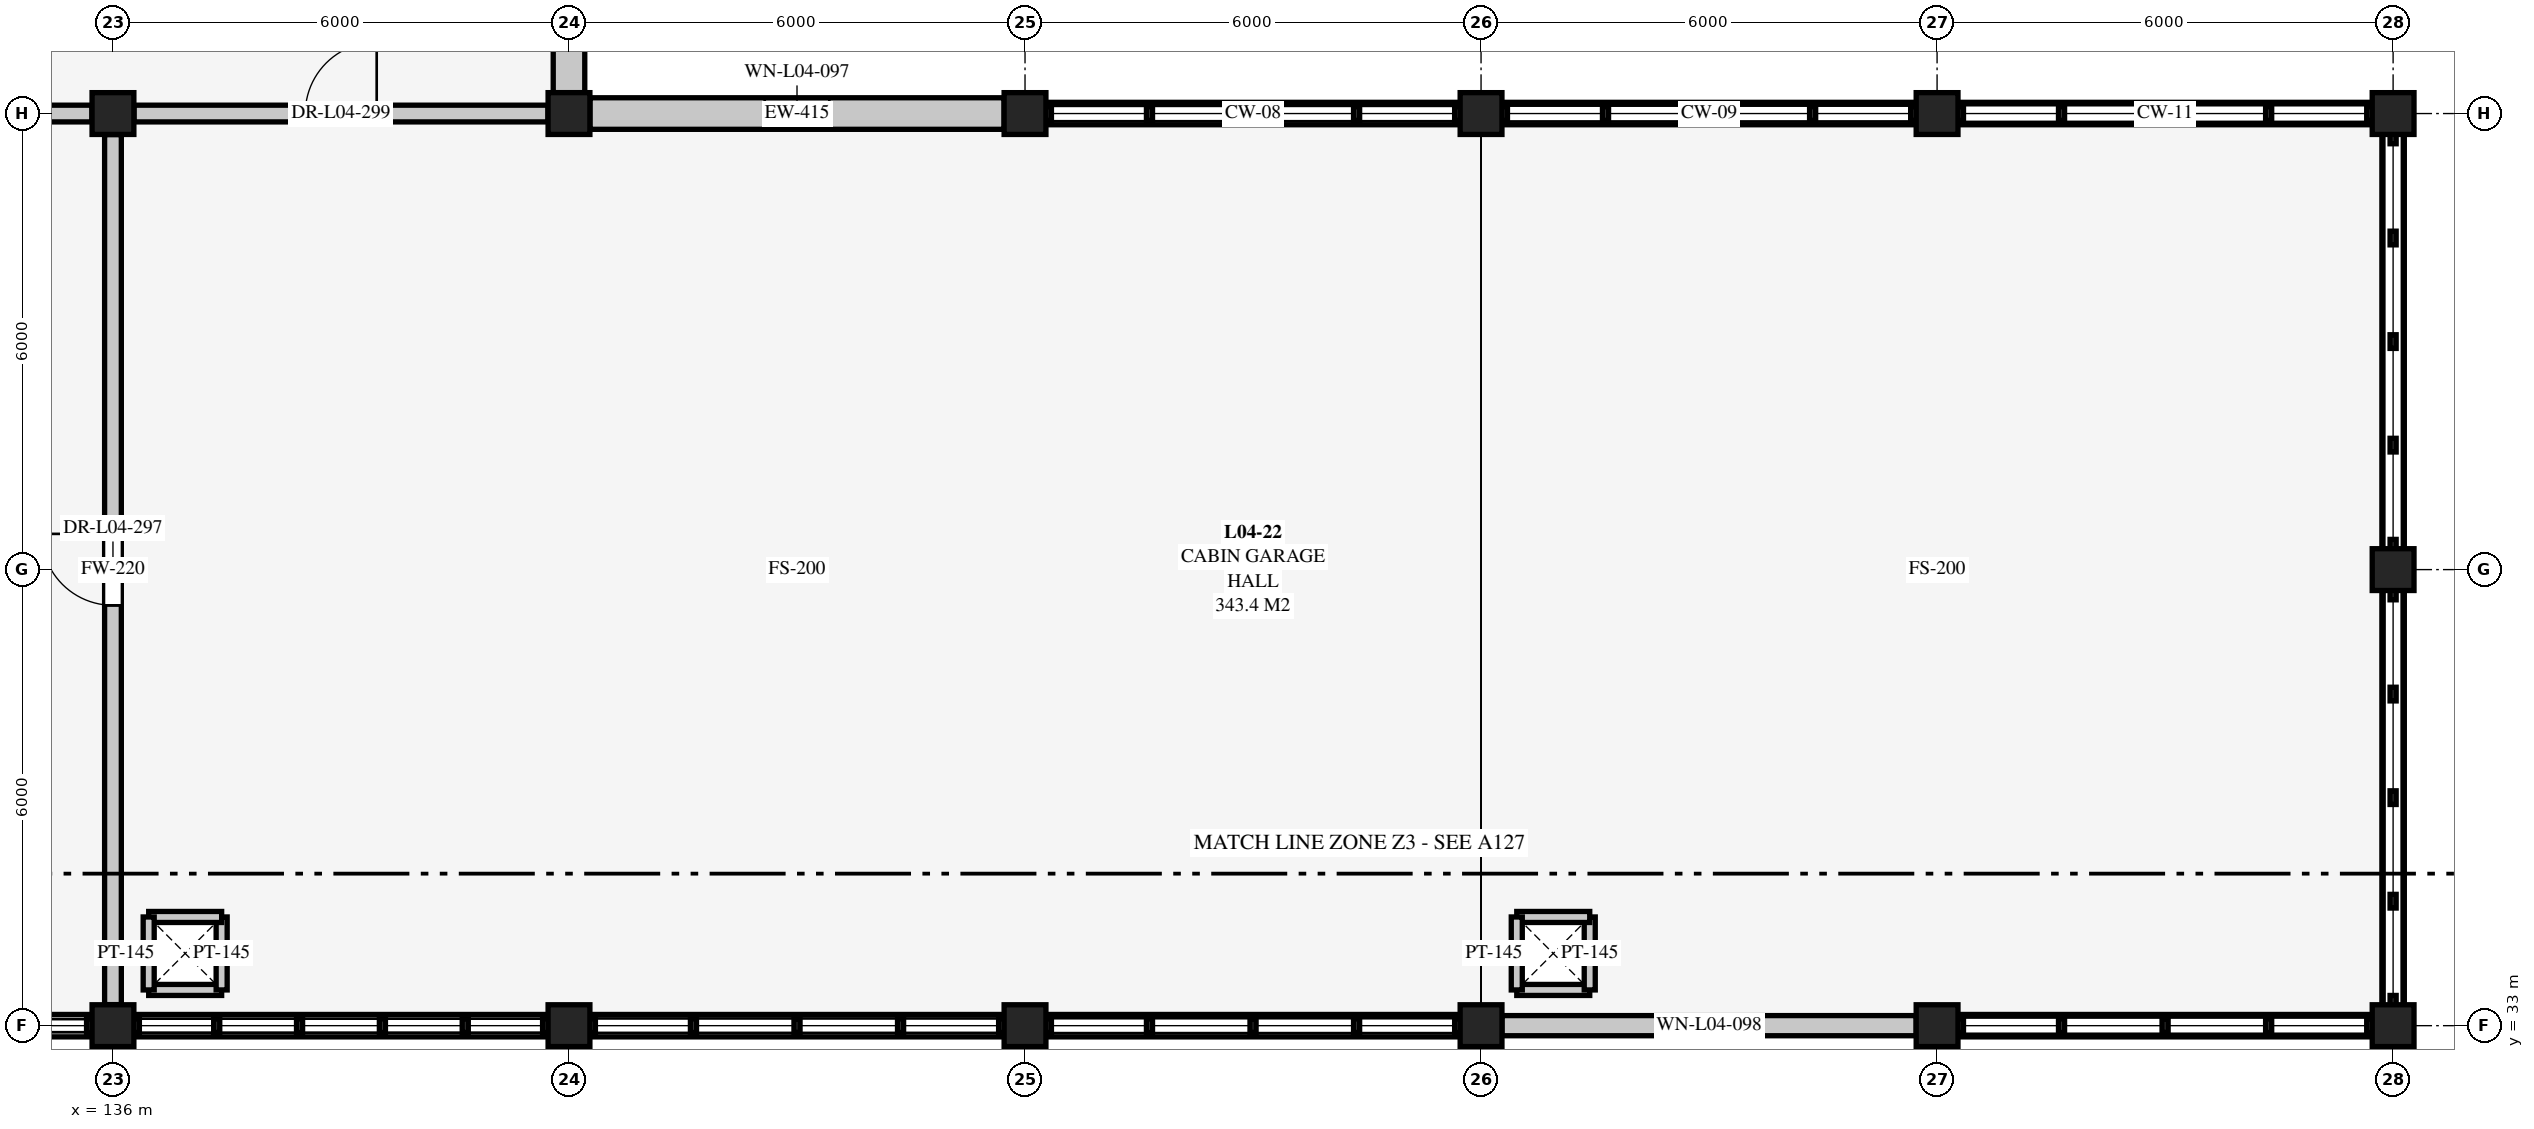
"""IFC4 building model, lengths in metres.
Left out: names, types, materials, properties, quantities, classifications, styles, units other than length and angle.
Written with IfcOpenShell. Run it as: python <this file> out.ifc"""

import sys

from ifc_helpers import new_model, si_unit, direction, frame, frame_2d, origin, origin_2d, place, context, subcontext, project, spatial, rectangle, extrude, element, fill, save


model = new_model("IFC4")
c1 = context("Model", 3, precision=1e-05, world=origin(), true_north=direction((0.0, 1.0)))
c2 = subcontext(c1, "Body", "Model", "MODEL_VIEW")
j1 = project(units=[si_unit("LENGTHUNIT", "METRE"), si_unit("PLANEANGLEUNIT", "RADIAN")], contexts=[c1])
p1 = place(None, origin())
s1 = spatial("IfcSite", under=j1, at=p1, CompositionType="ELEMENT")
p2 = place(p1, origin())
s2 = spatial("IfcBuilding", under=s1, at=p2, CompositionType="ELEMENT")
p3 = place(p2, frame((0.0, 0.0, 13.5)))
s3 = spatial("IfcBuildingStorey", under=s2, at=p3, CompositionType="ELEMENT", Elevation=13.5)
for number, where, z_axis, x_axis in (
    (1, (136.0, 33.0, 0.0), (0.0, 0.0, 1.0), (1.0, 0.0, 0.0)),
    (2, (136.0, 45.0, 0.0), (0.0, 0.0, 1.0), (1.0, 0.0, 0.0)),
    (3, (142.0, 33.0, 0.0), (0.0, 0.0, 1.0), (1.0, 0.0, 0.0)),
    (4, (142.0, 45.0, 0.0), (0.0, 0.0, 1.0), (1.0, 0.0, 0.0)),
    (5, (148.0, 33.0, 0.0), (0.0, 0.0, 1.0), (1.0, 0.0, 0.0)),
    (6, (148.0, 45.0, 0.0), (0.0, 0.0, 1.0), (1.0, 0.0, 0.0)),
    (7, (154.0, 33.0, 0.0), (0.0, 0.0, 1.0), (1.0, 0.0, 0.0)),
    (8, (154.0, 45.0, 0.0), (0.0, 0.0, 1.0), (1.0, 0.0, 0.0)),
    (9, (160.0, 33.0, 0.0), (0.0, 0.0, 1.0), (1.0, 0.0, 0.0)),
    (10, (160.0, 45.0, 0.0), (0.0, 0.0, 1.0), (1.0, 0.0, 0.0)),
    (11, (166.0, 33.0, 0.0), (0.0, 0.0, 1.0), (1.0, 0.0, 0.0)),
    (12, (166.0, 39.0, 0.0), (0.0, 0.0, 1.0), (1.0, 0.0, 0.0)),
    (13, (166.0, 45.0, 0.0), (0.0, 0.0, 1.0), (1.0, 0.0, 0.0)),
):
    element("IfcColumn", number, at=place(p3, frame(where, z_axis=z_axis, x_axis=x_axis)), inside=s3, PredefinedType="COLUMN", context=c2, shape_type="SweptSolid", body=[
        extrude(rectangle(XDim=0.55, YDim=0.55, at=origin_2d()), origin(), (0.0, 0.0, 1.0), 4.5),
    ])
p4 = place(p3, frame((135.725, 33.0, 0.0), z_axis=(0.0, 0.0, 1.0), x_axis=(-1.0, 0.0, 0.0)))
e14 = element("IfcWall", 14, at=p4, inside=s3, PredefinedType="SOLIDWALL", context=c2, shape_type="SweptSolid", body=[
    extrude(rectangle(XDim=5.45, YDim=0.295, at=frame_2d((2.725, 0.0))), origin(), (0.0, 0.0, 1.0), 0.26),
])
p5 = place(p3, frame((141.725, 33.0, 0.0), z_axis=(0.0, 0.0, 1.0), x_axis=(-1.0, 0.0, 0.0)))
e15 = element("IfcWall", 15, at=p5, inside=s3, PredefinedType="SOLIDWALL", context=c2, shape_type="SweptSolid", body=[
    extrude(rectangle(XDim=5.45, YDim=0.295, at=frame_2d((2.725, 0.0))), origin(), (0.0, 0.0, 1.0), 0.36),
])
p6 = place(p3, frame((147.725, 33.0, 0.0), z_axis=(0.0, 0.0, 1.0), x_axis=(-1.0, 0.0, 0.0)))
e16 = element("IfcWall", 16, at=p6, inside=s3, PredefinedType="SOLIDWALL", context=c2, shape_type="SweptSolid", body=[
    extrude(rectangle(XDim=5.45, YDim=0.295, at=frame_2d((2.725, 0.0))), origin(), (0.0, 0.0, 1.0), 0.41),
])
p7 = place(p3, frame((142.275, 45.0, 0.0), z_axis=(0.0, 0.0, 1.0), x_axis=(1.0, 0.0, 0.0)))
e17 = element("IfcWall", 17, at=p7, inside=s3, PredefinedType="SOLIDWALL", context=c2, shape_type="SweptSolid", body=[
    extrude(rectangle(XDim=5.45, YDim=0.415, at=frame_2d((2.725, 0.0))), origin(), (0.0, 0.0, 1.0), 4.093),
])
p8 = place(p7, frame((2.3, 0.0, 0.9)))
e18 = element("IfcOpeningElement", 18, at=p8, cuts=e17, PredefinedType="OPENING", context=c2, shape_type="SweptSolid", body=[
    extrude(rectangle(XDim=0.85, YDim=1.95, at=frame_2d((0.425, 0.975))), frame((0.0, 0.218, 0.0), z_axis=(0.0, -1.0, 0.0), x_axis=(1.0, 0.0, 0.0)), (0.0, 0.0, 1.0), 0.435),
])
p9 = place(p3, frame((153.725, 33.0, 0.0), z_axis=(0.0, 0.0, 1.0), x_axis=(-1.0, 0.0, 0.0)))
e19 = element("IfcWall", 19, at=p9, inside=s3, PredefinedType="SOLIDWALL", context=c2, shape_type="SweptSolid", body=[
    extrude(rectangle(XDim=5.45, YDim=0.295, at=frame_2d((2.725, 0.0))), origin(), (0.0, 0.0, 1.0), 0.46),
])
p10 = place(p3, frame((148.275, 45.0, 0.0), z_axis=(0.0, 0.0, 1.0), x_axis=(1.0, 0.0, 0.0)))
e20 = element("IfcWall", 20, at=p10, inside=s3, PredefinedType="SOLIDWALL", context=c2, shape_type="SweptSolid", body=[
    extrude(rectangle(XDim=5.45, YDim=0.295, at=frame_2d((2.725, 0.0))), origin(), (0.0, 0.0, 1.0), 0.52),
])
p11 = place(p3, frame((159.725, 33.0, 0.0), z_axis=(0.0, 0.0, 1.0), x_axis=(-1.0, 0.0, 0.0)))
e21 = element("IfcWall", 21, at=p11, inside=s3, PredefinedType="SOLIDWALL", context=c2, shape_type="SweptSolid", body=[
    extrude(rectangle(XDim=5.45, YDim=0.265, at=frame_2d((2.725, 0.0))), origin(), (0.0, 0.0, 1.0), 4.093),
])
p12 = place(p11, frame((2.25, 0.0, 0.9)))
e22 = element("IfcOpeningElement", 22, at=p12, cuts=e21, PredefinedType="OPENING", context=c2, shape_type="SweptSolid", body=[
    extrude(rectangle(XDim=0.95, YDim=1.95, at=frame_2d((0.475, 0.975))), frame((0.0, 0.142, 0.0), z_axis=(0.0, -1.0, 0.0), x_axis=(1.0, 0.0, 0.0)), (0.0, 0.0, 1.0), 0.285),
])
p13 = place(p3, frame((154.275, 45.0, 0.0), z_axis=(0.0, 0.0, 1.0), x_axis=(1.0, 0.0, 0.0)))
e23 = element("IfcWall", 23, at=p13, inside=s3, PredefinedType="SOLIDWALL", context=c2, shape_type="SweptSolid", body=[
    extrude(rectangle(XDim=5.45, YDim=0.295, at=frame_2d((2.725, 0.0))), origin(), (0.0, 0.0, 1.0), 0.16),
])
p14 = place(p3, frame((165.725, 33.0, 0.0), z_axis=(0.0, 0.0, 1.0), x_axis=(-1.0, 0.0, 0.0)))
e24 = element("IfcWall", 24, at=p14, inside=s3, PredefinedType="SOLIDWALL", context=c2, shape_type="SweptSolid", body=[
    extrude(rectangle(XDim=5.45, YDim=0.295, at=frame_2d((2.725, 0.0))), origin(), (0.0, 0.0, 1.0), 0.21),
])
p15 = place(p3, frame((160.275, 45.0, 0.0), z_axis=(0.0, 0.0, 1.0), x_axis=(1.0, 0.0, 0.0)))
e25 = element("IfcWall", 25, at=p15, inside=s3, PredefinedType="SOLIDWALL", context=c2, shape_type="SweptSolid", body=[
    extrude(rectangle(XDim=5.45, YDim=0.295, at=frame_2d((2.725, 0.0))), origin(), (0.0, 0.0, 1.0), 0.26),
])
p16 = place(p3, frame((166.0, 38.725, 0.0), z_axis=(0.0, 0.0, 1.0), x_axis=(0.0, -1.0, 0.0)))
e26 = element("IfcWall", 26, at=p16, inside=s3, PredefinedType="SOLIDWALL", context=c2, shape_type="SweptSolid", body=[
    extrude(rectangle(XDim=5.45, YDim=0.295, at=frame_2d((2.725, 0.0))), origin(), (0.0, 0.0, 1.0), 0.31),
])
p17 = place(p3, frame((166.0, 44.725, 0.0), z_axis=(0.0, 0.0, 1.0), x_axis=(0.0, -1.0, 0.0)))
e27 = element("IfcWall", 27, at=p17, inside=s3, PredefinedType="SOLIDWALL", context=c2, shape_type="SweptSolid", body=[
    extrude(rectangle(XDim=5.45, YDim=0.295, at=frame_2d((2.725, 0.0))), origin(), (0.0, 0.0, 1.0), 0.36),
])
p18 = place(p3, frame((142.0, 50.725, 0.0), z_axis=(0.0, 0.0, 1.0), x_axis=(0.0, -1.0, 0.0)))
e28 = element("IfcWall", 28, at=p18, inside=s3, PredefinedType="SOLIDWALL", context=c2, shape_type="SweptSolid", body=[
    extrude(rectangle(XDim=5.45, YDim=0.415, at=frame_2d((2.725, 0.0))), origin(), (0.0, 0.0, 1.0), 4.093),
])
p19 = place(p18, frame((2.15, 0.0, 0.85)))
e29 = element("IfcOpeningElement", 29, at=p19, cuts=e28, PredefinedType="OPENING", context=c2, shape_type="SweptSolid", body=[
    extrude(rectangle(XDim=1.15, YDim=2.05, at=frame_2d((0.575, 1.025))), frame((0.0, 0.218, 0.0), z_axis=(0.0, -1.0, 0.0), x_axis=(1.0, 0.0, 0.0)), (0.0, 0.0, 1.0), 0.435),
])
for number, where, z_axis, x_axis in (
    (30, (136.47, 33.47, 0.0), (0.0, 0.0, 1.0), (1.0, 0.0, 0.0)),
    (31, (137.43, 33.47, 0.0), (0.0, 0.0, 1.0), (0.0, 1.0, 0.0)),
    (32, (137.43, 34.43, 0.0), (0.0, 0.0, 1.0), (-1.0, 0.0, 0.0)),
    (33, (136.47, 34.43, 0.0), (0.0, 0.0, 1.0), (0.0, -1.0, 0.0)),
    (34, (154.47, 33.47, 0.0), (0.0, 0.0, 1.0), (1.0, 0.0, 0.0)),
    (35, (155.43, 33.47, 0.0), (0.0, 0.0, 1.0), (0.0, 1.0, 0.0)),
    (36, (155.43, 34.43, 0.0), (0.0, 0.0, 1.0), (-1.0, 0.0, 0.0)),
    (37, (154.47, 34.43, 0.0), (0.0, 0.0, 1.0), (0.0, -1.0, 0.0)),
):
    element("IfcWall", number, at=place(p3, frame(where, z_axis=z_axis, x_axis=x_axis)), inside=s3, PredefinedType="PARTITIONING", context=c2, shape_type="SweptSolid", body=[
        extrude(rectangle(XDim=0.96, YDim=0.145, at=frame_2d((0.48, 0.0))), origin(), (0.0, 0.0, 1.0), 4.24),
    ])
p20 = place(p3, frame((136.0, 33.277, 0.0), z_axis=(0.0, 0.0, 1.0), x_axis=(0.0, 1.0, 0.0)))
e38 = element("IfcWall", 38, at=p20, inside=s3, PredefinedType="SOLIDWALL", context=c2, shape_type="SweptSolid", body=[
    extrude(rectangle(XDim=11.446, YDim=0.22, at=frame_2d((5.723, 0.0))), origin(), (0.0, 0.0, 1.0), 3.883),
])
p21 = place(p20, frame((5.253, 0.0, 0.0)))
e39 = element("IfcOpeningElement", 39, at=p21, cuts=e38, PredefinedType="OPENING", context=c2, shape_type="SweptSolid", body=[
    extrude(rectangle(XDim=0.94, YDim=2.1, at=frame_2d((0.47, 1.05))), frame((0.0, 0.12, 0.0), z_axis=(0.0, -1.0, 0.0), x_axis=(1.0, 0.0, 0.0)), (0.0, 0.0, 1.0), 0.24),
])
p22 = place(p3, frame((130.277, 45.0, 0.0), z_axis=(0.0, 0.0, 1.0), x_axis=(1.0, 0.0, 0.0)))
e40 = element("IfcWall", 40, at=p22, inside=s3, PredefinedType="SOLIDWALL", context=c2, shape_type="SweptSolid", body=[
    extrude(rectangle(XDim=5.446, YDim=0.22, at=frame_2d((2.723, 0.0))), origin(), (0.0, 0.0, 1.0), 4.146),
])
p23 = place(p22, frame((2.253, 0.0, 0.0)))
e41 = element("IfcOpeningElement", 41, at=p23, cuts=e40, PredefinedType="OPENING", context=c2, shape_type="SweptSolid", body=[
    extrude(rectangle(XDim=0.94, YDim=2.1, at=frame_2d((0.47, 1.05))), frame((0.0, 0.12, 0.0), z_axis=(0.0, -1.0, 0.0), x_axis=(1.0, 0.0, 0.0)), (0.0, 0.0, 1.0), 0.24),
])
p24 = place(p3, frame((136.277, 45.0, 0.0), z_axis=(0.0, 0.0, 1.0), x_axis=(1.0, 0.0, 0.0)))
e42 = element("IfcWall", 42, at=p24, inside=s3, PredefinedType="SOLIDWALL", context=c2, shape_type="SweptSolid", body=[
    extrude(rectangle(XDim=5.446, YDim=0.22, at=frame_2d((2.723, 0.0))), origin(), (0.0, 0.0, 1.0), 4.24),
])
p25 = place(p24, frame((2.253, 0.0, 0.0)))
e43 = element("IfcOpeningElement", 43, at=p25, cuts=e42, PredefinedType="OPENING", context=c2, shape_type="SweptSolid", body=[
    extrude(rectangle(XDim=0.94, YDim=2.1, at=frame_2d((0.47, 1.05))), frame((0.0, 0.12, 0.0), z_axis=(0.0, -1.0, 0.0), x_axis=(1.0, 0.0, 0.0)), (0.0, 0.0, 1.0), 0.24),
])
p26 = place(p8, origin())
e44 = element("IfcWindow", 44, at=p26, inside=s3, PartitioningType="SINGLE_PANEL", PredefinedType="WINDOW", context=c2, shape_type="SweptSolid", body=[
    extrude(rectangle(XDim=0.85, YDim=1.95, at=frame_2d((0.425, 0.975))), frame((0.0, 0.03, 0.0), z_axis=(0.0, -1.0, 0.0), x_axis=(1.0, 0.0, 0.0)), (0.0, 0.0, 1.0), 0.06),
])
fill(e18, e44)
p27 = place(p12, origin())
e45 = element("IfcWindow", 45, at=p27, inside=s3, PartitioningType="SINGLE_PANEL", PredefinedType="WINDOW", context=c2, shape_type="SweptSolid", body=[
    extrude(rectangle(XDim=0.95, YDim=1.95, at=frame_2d((0.475, 0.975))), frame((0.0, 0.03, 0.0), z_axis=(0.0, -1.0, 0.0), x_axis=(1.0, 0.0, 0.0)), (0.0, 0.0, 1.0), 0.06),
])
fill(e22, e45)
p28 = place(p21, origin())
e46 = element("IfcDoor", 46, at=p28, inside=s3, OperationType="SINGLE_SWING_RIGHT", PredefinedType="DOOR", context=c2, shape_type="SweptSolid", body=[
    extrude(rectangle(XDim=0.94, YDim=2.1, at=frame_2d((0.47, 1.05))), frame((0.0, 0.025, 0.0), z_axis=(0.0, -1.0, 0.0), x_axis=(1.0, 0.0, 0.0)), (0.0, 0.0, 1.0), 0.05),
])
fill(e39, e46)
p29 = place(p25, origin())
e47 = element("IfcDoor", 47, at=p29, inside=s3, OperationType="SINGLE_SWING_RIGHT", PredefinedType="DOOR", context=c2, shape_type="SweptSolid", body=[
    extrude(rectangle(XDim=0.94, YDim=2.1, at=frame_2d((0.47, 1.05))), frame((0.0, 0.025, 0.0), z_axis=(0.0, -1.0, 0.0), x_axis=(1.0, 0.0, 0.0)), (0.0, 0.0, 1.0), 0.05),
])
fill(e43, e47)
save(model, sys.argv[1])
